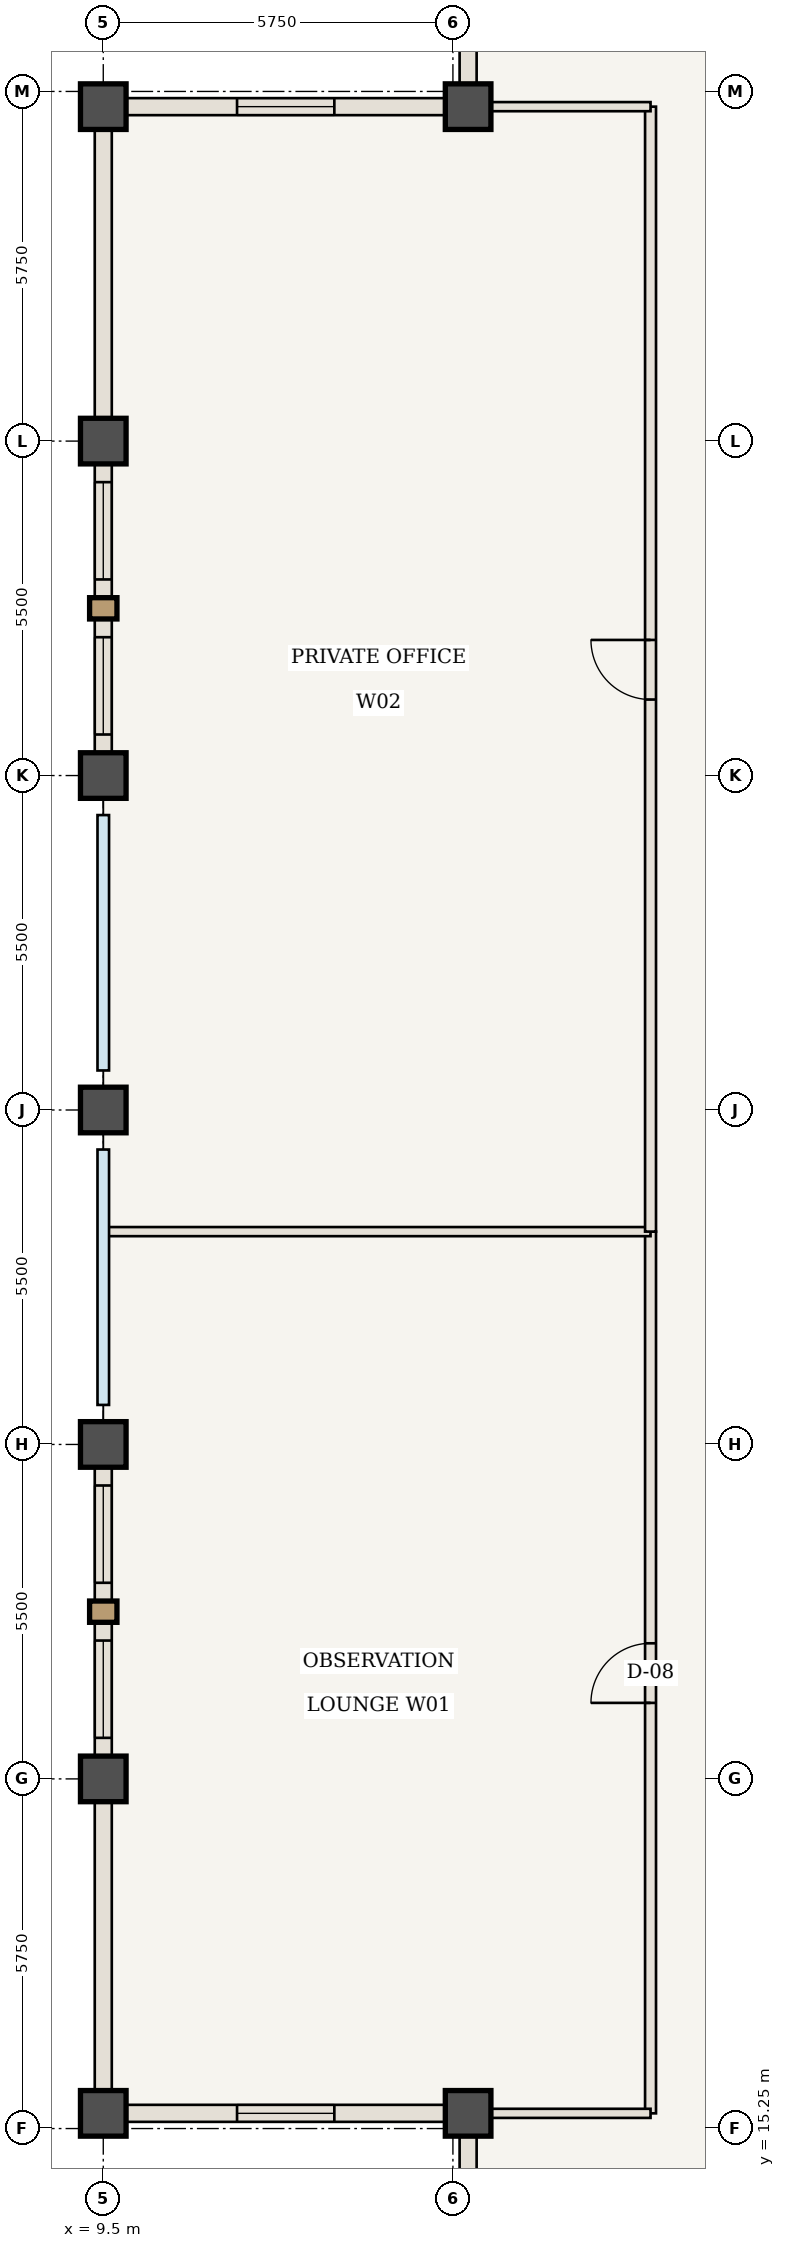
"""IFC4 building model, lengths in metres.
Left out: names, types, materials, properties, quantities, classifications, styles, units other than length and angle.
Written with IfcOpenShell. Run it as: python <this file> out.ifc"""

import sys

from ifc_helpers import new_model, si_unit, direction, frame, frame_2d, origin, origin_2d, place, context, subcontext, project, spatial, rectangle, extrude, element, fill, save


model = new_model("IFC4")
c1 = context("Model", 3, precision=1e-05, world=origin(), true_north=direction((0.0, 1.0)))
c2 = subcontext(c1, "Body", "Model", "MODEL_VIEW")
j1 = project(units=[si_unit("LENGTHUNIT", "METRE"), si_unit("PLANEANGLEUNIT", "RADIAN")], contexts=[c1])
p1 = place(None, origin())
s1 = spatial("IfcSite", under=j1, at=p1, CompositionType="ELEMENT")
p2 = place(p1, origin())
s2 = spatial("IfcBuilding", under=s1, at=p2, CompositionType="ELEMENT")
p3 = place(p2, frame((0.0, 0.0, 308.35)))
s3 = spatial("IfcBuildingStorey", under=s2, at=p3, CompositionType="ELEMENT", Elevation=308.35)
for number, where, z_axis, x_axis in (
    (1, (15.5, 15.5, 0.0), (0.0, 0.0, 1.0), (1.0, 0.0, 0.0)),
    (2, (9.5, 15.5, 0.0), (0.0, 0.0, 1.0), (1.0, 0.0, 0.0)),
    (3, (15.5, 48.5, 0.0), (0.0, 0.0, 1.0), (1.0, 0.0, 0.0)),
    (4, (9.5, 48.5, 0.0), (0.0, 0.0, 1.0), (1.0, 0.0, 0.0)),
    (5, (9.5, 21.0, 0.0), (0.0, 0.0, 1.0), (1.0, 0.0, 0.0)),
    (6, (9.5, 26.5, 0.0), (0.0, 0.0, 1.0), (1.0, 0.0, 0.0)),
    (7, (9.5, 32.0, 0.0), (0.0, 0.0, 1.0), (1.0, 0.0, 0.0)),
    (8, (9.5, 37.5, 0.0), (0.0, 0.0, 1.0), (1.0, 0.0, 0.0)),
    (9, (9.5, 43.0, 0.0), (0.0, 0.0, 1.0), (1.0, 0.0, 0.0)),
):
    element("IfcColumn", number, at=place(p3, frame(where, z_axis=z_axis, x_axis=x_axis)), inside=s3, PredefinedType="COLUMN", context=c2, shape_type="SweptSolid", body=[
        extrude(rectangle(XDim=0.75, YDim=0.75, at=origin_2d()), origin(), (0.0, 0.0, 1.0), 4.9),
    ])
p4 = place(p3, frame((18.5, 15.5, 0.0), z_axis=(0.0, 0.0, 1.0), x_axis=(0.0, 1.0, 0.0)))
e10 = element("IfcWall", 10, at=p4, inside=s3, PredefinedType="STANDARD", context=c2, shape_type="SweptSolid", body=[
    extrude(rectangle(XDim=14.5, YDim=0.18, at=frame_2d((7.25, 0.0))), origin(), (0.0, 0.0, 1.0), 4.64),
])
p5 = place(p4, frame((6.75, 0.0, 0.0)))
e11 = element("IfcOpeningElement", 11, at=p5, cuts=e10, PredefinedType="OPENING", context=c2, shape_type="SweptSolid", body=[
    extrude(rectangle(XDim=0.98, YDim=2.2, at=frame_2d((0.49, 1.1))), frame((0.0, 0.1, 0.0), z_axis=(0.0, -1.0, 0.0), x_axis=(1.0, 0.0, 0.0)), (0.0, 0.0, 1.0), 0.2),
])
p6 = place(p3, frame((9.56, 30.0, 0.0), z_axis=(0.0, 0.0, 1.0), x_axis=(1.0, 0.0, 0.0)))
e12 = element("IfcWall", 12, at=p6, inside=s3, PredefinedType="STANDARD", context=c2, shape_type="SweptSolid", body=[
    extrude(rectangle(XDim=8.94, YDim=0.15, at=frame_2d((4.47, 0.0))), origin(), (0.0, 0.0, 1.0), 4.64),
])
p7 = place(p3, frame((18.5, 30.0, 0.0), z_axis=(0.0, 0.0, 1.0), x_axis=(0.0, 1.0, 0.0)))
e13 = element("IfcWall", 13, at=p7, inside=s3, PredefinedType="STANDARD", context=c2, shape_type="SweptSolid", body=[
    extrude(rectangle(XDim=18.5, YDim=0.18, at=frame_2d((9.25, 0.0))), origin(), (0.0, 0.0, 1.0), 4.64),
])
p8 = place(p7, frame((8.75, 0.0, 0.0)))
e14 = element("IfcOpeningElement", 14, at=p8, cuts=e13, PredefinedType="OPENING", context=c2, shape_type="SweptSolid", body=[
    extrude(rectangle(XDim=0.98, YDim=2.2, at=frame_2d((0.49, 1.1))), frame((0.0, 0.1, 0.0), z_axis=(0.0, -1.0, 0.0), x_axis=(1.0, 0.0, 0.0)), (0.0, 0.0, 1.0), 0.2),
])
for number, where, z_axis, x_axis in (
    (15, (15.5, 15.5, 0.0), (0.0, 0.0, 1.0), (1.0, 0.0, 0.0)),
    (16, (15.5, 48.5, 0.0), (0.0, 0.0, 1.0), (1.0, 0.0, 0.0)),
):
    element("IfcWall", number, at=place(p3, frame(where, z_axis=z_axis, x_axis=x_axis)), inside=s3, PredefinedType="STANDARD", context=c2, shape_type="SweptSolid", body=[
        extrude(rectangle(XDim=3.0, YDim=0.15, at=frame_2d((1.5, 0.0))), origin(), (0.0, 0.0, 1.0), 4.64),
    ])
p9 = place(p3, frame((9.5, 15.5, 0.0), z_axis=(0.0, 0.0, 1.0), x_axis=(0.0, 1.0, 0.0)))
e17 = element("IfcWall", 17, at=p9, inside=s3, PredefinedType="USERDEFINED", context=c2, shape_type="SweptSolid", body=[
    extrude(rectangle(XDim=5.5, YDim=0.28, at=frame_2d((2.75, 0.0))), origin(), (0.0, 0.0, 1.0), 3.94),
])
p10 = place(p3, frame((9.5, 21.0, 0.0), z_axis=(0.0, 0.0, 1.0), x_axis=(0.0, 1.0, 0.0)))
e18 = element("IfcWall", 18, at=p10, inside=s3, PredefinedType="USERDEFINED", context=c2, shape_type="SweptSolid", body=[
    extrude(rectangle(XDim=5.5, YDim=0.28, at=frame_2d((2.75, 0.0))), origin(), (0.0, 0.0, 1.0), 3.94),
])
p11 = place(p10, frame((0.675, 0.0, 0.85)))
e19 = element("IfcOpeningElement", 19, at=p11, cuts=e18, PredefinedType="OPENING", context=c2, shape_type="SweptSolid", body=[
    extrude(rectangle(XDim=1.6, YDim=2.15, at=frame_2d((0.8, 1.075))), frame((0.0, 0.15, 0.0), z_axis=(0.0, -1.0, 0.0), x_axis=(1.0, 0.0, 0.0)), (0.0, 0.0, 1.0), 0.3),
])
p12 = place(p10, frame((3.225, 0.0, 0.85)))
e20 = element("IfcOpeningElement", 20, at=p12, cuts=e18, PredefinedType="OPENING", context=c2, shape_type="SweptSolid", body=[
    extrude(rectangle(XDim=1.6, YDim=2.15, at=frame_2d((0.8, 1.075))), frame((0.0, 0.15, 0.0), z_axis=(0.0, -1.0, 0.0), x_axis=(1.0, 0.0, 0.0)), (0.0, 0.0, 1.0), 0.3),
])
p13 = place(p3, frame((9.5, 37.5, 0.0), z_axis=(0.0, 0.0, 1.0), x_axis=(0.0, 1.0, 0.0)))
e21 = element("IfcWall", 21, at=p13, inside=s3, PredefinedType="USERDEFINED", context=c2, shape_type="SweptSolid", body=[
    extrude(rectangle(XDim=5.5, YDim=0.28, at=frame_2d((2.75, 0.0))), origin(), (0.0, 0.0, 1.0), 3.94),
])
p14 = place(p13, frame((0.675, 0.0, 0.85)))
e22 = element("IfcOpeningElement", 22, at=p14, cuts=e21, PredefinedType="OPENING", context=c2, shape_type="SweptSolid", body=[
    extrude(rectangle(XDim=1.6, YDim=2.15, at=frame_2d((0.8, 1.075))), frame((0.0, 0.15, 0.0), z_axis=(0.0, -1.0, 0.0), x_axis=(1.0, 0.0, 0.0)), (0.0, 0.0, 1.0), 0.3),
])
p15 = place(p13, frame((3.225, 0.0, 0.85)))
e23 = element("IfcOpeningElement", 23, at=p15, cuts=e21, PredefinedType="OPENING", context=c2, shape_type="SweptSolid", body=[
    extrude(rectangle(XDim=1.6, YDim=2.15, at=frame_2d((0.8, 1.075))), frame((0.0, 0.15, 0.0), z_axis=(0.0, -1.0, 0.0), x_axis=(1.0, 0.0, 0.0)), (0.0, 0.0, 1.0), 0.3),
])
p16 = place(p3, frame((9.5, 43.0, 0.0), z_axis=(0.0, 0.0, 1.0), x_axis=(0.0, 1.0, 0.0)))
e24 = element("IfcWall", 24, at=p16, inside=s3, PredefinedType="USERDEFINED", context=c2, shape_type="SweptSolid", body=[
    extrude(rectangle(XDim=5.5, YDim=0.28, at=frame_2d((2.75, 0.0))), origin(), (0.0, 0.0, 1.0), 3.94),
])
p17 = place(p3, frame((15.5, 9.5, 0.0), z_axis=(0.0, 0.0, 1.0), x_axis=(0.0, 1.0, 0.0)))
e25 = element("IfcWall", 25, at=p17, inside=s3, PredefinedType="USERDEFINED", context=c2, shape_type="SweptSolid", body=[
    extrude(rectangle(XDim=6.0, YDim=0.28, at=frame_2d((3.0, 0.0))), origin(), (0.0, 0.0, 1.0), 3.94),
])
p18 = place(p17, frame((2.2, 0.0, 0.85)))
e26 = element("IfcOpeningElement", 26, at=p18, cuts=e25, PredefinedType="OPENING", context=c2, shape_type="SweptSolid", body=[
    extrude(rectangle(XDim=1.6, YDim=2.05, at=frame_2d((0.8, 1.025))), frame((0.0, 0.15, 0.0), z_axis=(0.0, -1.0, 0.0), x_axis=(1.0, 0.0, 0.0)), (0.0, 0.0, 1.0), 0.3),
])
p19 = place(p3, frame((15.5, 15.5, 0.0), z_axis=(0.0, 0.0, 1.0), x_axis=(-1.0, 0.0, 0.0)))
e27 = element("IfcWall", 27, at=p19, inside=s3, PredefinedType="USERDEFINED", context=c2, shape_type="SweptSolid", body=[
    extrude(rectangle(XDim=6.0, YDim=0.28, at=frame_2d((3.0, 0.0))), origin(), (0.0, 0.0, 1.0), 3.94),
])
p20 = place(p19, frame((2.2, 0.0, 0.85)))
e28 = element("IfcOpeningElement", 28, at=p20, cuts=e27, PredefinedType="OPENING", context=c2, shape_type="SweptSolid", body=[
    extrude(rectangle(XDim=1.6, YDim=2.05, at=frame_2d((0.8, 1.025))), frame((0.0, 0.15, 0.0), z_axis=(0.0, -1.0, 0.0), x_axis=(1.0, 0.0, 0.0)), (0.0, 0.0, 1.0), 0.3),
])
p21 = place(p3, frame((15.5, 48.5, 0.0), z_axis=(0.0, 0.0, 1.0), x_axis=(0.0, 1.0, 0.0)))
e29 = element("IfcWall", 29, at=p21, inside=s3, PredefinedType="USERDEFINED", context=c2, shape_type="SweptSolid", body=[
    extrude(rectangle(XDim=6.0, YDim=0.28, at=frame_2d((3.0, 0.0))), origin(), (0.0, 0.0, 1.0), 3.94),
])
p22 = place(p21, frame((2.2, 0.0, 0.85)))
e30 = element("IfcOpeningElement", 30, at=p22, cuts=e29, PredefinedType="OPENING", context=c2, shape_type="SweptSolid", body=[
    extrude(rectangle(XDim=1.6, YDim=2.05, at=frame_2d((0.8, 1.025))), frame((0.0, 0.15, 0.0), z_axis=(0.0, -1.0, 0.0), x_axis=(1.0, 0.0, 0.0)), (0.0, 0.0, 1.0), 0.3),
])
p23 = place(p3, frame((9.5, 48.5, 0.0), z_axis=(0.0, 0.0, 1.0), x_axis=(1.0, 0.0, 0.0)))
e31 = element("IfcWall", 31, at=p23, inside=s3, PredefinedType="USERDEFINED", context=c2, shape_type="SweptSolid", body=[
    extrude(rectangle(XDim=6.0, YDim=0.28, at=frame_2d((3.0, 0.0))), origin(), (0.0, 0.0, 1.0), 3.94),
])
p24 = place(p23, frame((2.2, 0.0, 0.85)))
e32 = element("IfcOpeningElement", 32, at=p24, cuts=e31, PredefinedType="OPENING", context=c2, shape_type="SweptSolid", body=[
    extrude(rectangle(XDim=1.6, YDim=2.05, at=frame_2d((0.8, 1.025))), frame((0.0, 0.15, 0.0), z_axis=(0.0, -1.0, 0.0), x_axis=(1.0, 0.0, 0.0)), (0.0, 0.0, 1.0), 0.3),
])
p25 = place(p5, origin())
e33 = element("IfcDoor", 33, at=p25, inside=s3, OperationType="SINGLE_SWING_LEFT", PredefinedType="DOOR", context=c2, shape_type="SweptSolid", body=[
    extrude(rectangle(XDim=0.98, YDim=2.2, at=frame_2d((0.49, 1.1))), frame((0.0, 0.025, 0.0), z_axis=(0.0, -1.0, 0.0), x_axis=(1.0, 0.0, 0.0)), (0.0, 0.0, 1.0), 0.05),
])
fill(e11, e33)
p26 = place(p8, origin())
e34 = element("IfcDoor", 34, at=p26, inside=s3, OperationType="SINGLE_SWING_RIGHT", PredefinedType="DOOR", context=c2, shape_type="SweptSolid", body=[
    extrude(rectangle(XDim=0.98, YDim=2.2, at=frame_2d((0.49, 1.1))), frame((0.0, 0.025, 0.0), z_axis=(0.0, -1.0, 0.0), x_axis=(1.0, 0.0, 0.0)), (0.0, 0.0, 1.0), 0.05),
])
fill(e14, e34)
p27 = place(p11, origin())
e35 = element("IfcWindow", 35, at=p27, inside=s3, PartitioningType="SINGLE_PANEL", PredefinedType="WINDOW", context=c2, shape_type="SweptSolid", body=[
    extrude(rectangle(XDim=1.6, YDim=2.15, at=frame_2d((0.8, 1.075))), frame((0.0, 0.03, 0.0), z_axis=(0.0, -1.0, 0.0), x_axis=(1.0, 0.0, 0.0)), (0.0, 0.0, 1.0), 0.06),
])
fill(e19, e35)
p28 = place(p12, origin())
e36 = element("IfcWindow", 36, at=p28, inside=s3, PartitioningType="SINGLE_PANEL", PredefinedType="WINDOW", context=c2, shape_type="SweptSolid", body=[
    extrude(rectangle(XDim=1.6, YDim=2.15, at=frame_2d((0.8, 1.075))), frame((0.0, 0.03, 0.0), z_axis=(0.0, -1.0, 0.0), x_axis=(1.0, 0.0, 0.0)), (0.0, 0.0, 1.0), 0.06),
])
fill(e20, e36)
p29 = place(p14, origin())
e37 = element("IfcWindow", 37, at=p29, inside=s3, PartitioningType="SINGLE_PANEL", PredefinedType="WINDOW", context=c2, shape_type="SweptSolid", body=[
    extrude(rectangle(XDim=1.6, YDim=2.15, at=frame_2d((0.8, 1.075))), frame((0.0, 0.03, 0.0), z_axis=(0.0, -1.0, 0.0), x_axis=(1.0, 0.0, 0.0)), (0.0, 0.0, 1.0), 0.06),
])
fill(e22, e37)
p30 = place(p15, origin())
e38 = element("IfcWindow", 38, at=p30, inside=s3, PartitioningType="SINGLE_PANEL", PredefinedType="WINDOW", context=c2, shape_type="SweptSolid", body=[
    extrude(rectangle(XDim=1.6, YDim=2.15, at=frame_2d((0.8, 1.075))), frame((0.0, 0.03, 0.0), z_axis=(0.0, -1.0, 0.0), x_axis=(1.0, 0.0, 0.0)), (0.0, 0.0, 1.0), 0.06),
])
fill(e23, e38)
p31 = place(p20, origin())
e39 = element("IfcWindow", 39, at=p31, inside=s3, PartitioningType="SINGLE_PANEL", PredefinedType="WINDOW", context=c2, shape_type="SweptSolid", body=[
    extrude(rectangle(XDim=1.6, YDim=2.05, at=frame_2d((0.8, 1.025))), frame((0.0, 0.03, 0.0), z_axis=(0.0, -1.0, 0.0), x_axis=(1.0, 0.0, 0.0)), (0.0, 0.0, 1.0), 0.06),
])
fill(e28, e39)
p32 = place(p24, origin())
e40 = element("IfcWindow", 40, at=p32, inside=s3, PartitioningType="SINGLE_PANEL", PredefinedType="WINDOW", context=c2, shape_type="SweptSolid", body=[
    extrude(rectangle(XDim=1.6, YDim=2.05, at=frame_2d((0.8, 1.025))), frame((0.0, 0.03, 0.0), z_axis=(0.0, -1.0, 0.0), x_axis=(1.0, 0.0, 0.0)), (0.0, 0.0, 1.0), 0.06),
])
fill(e32, e40)
save(model, sys.argv[1])
